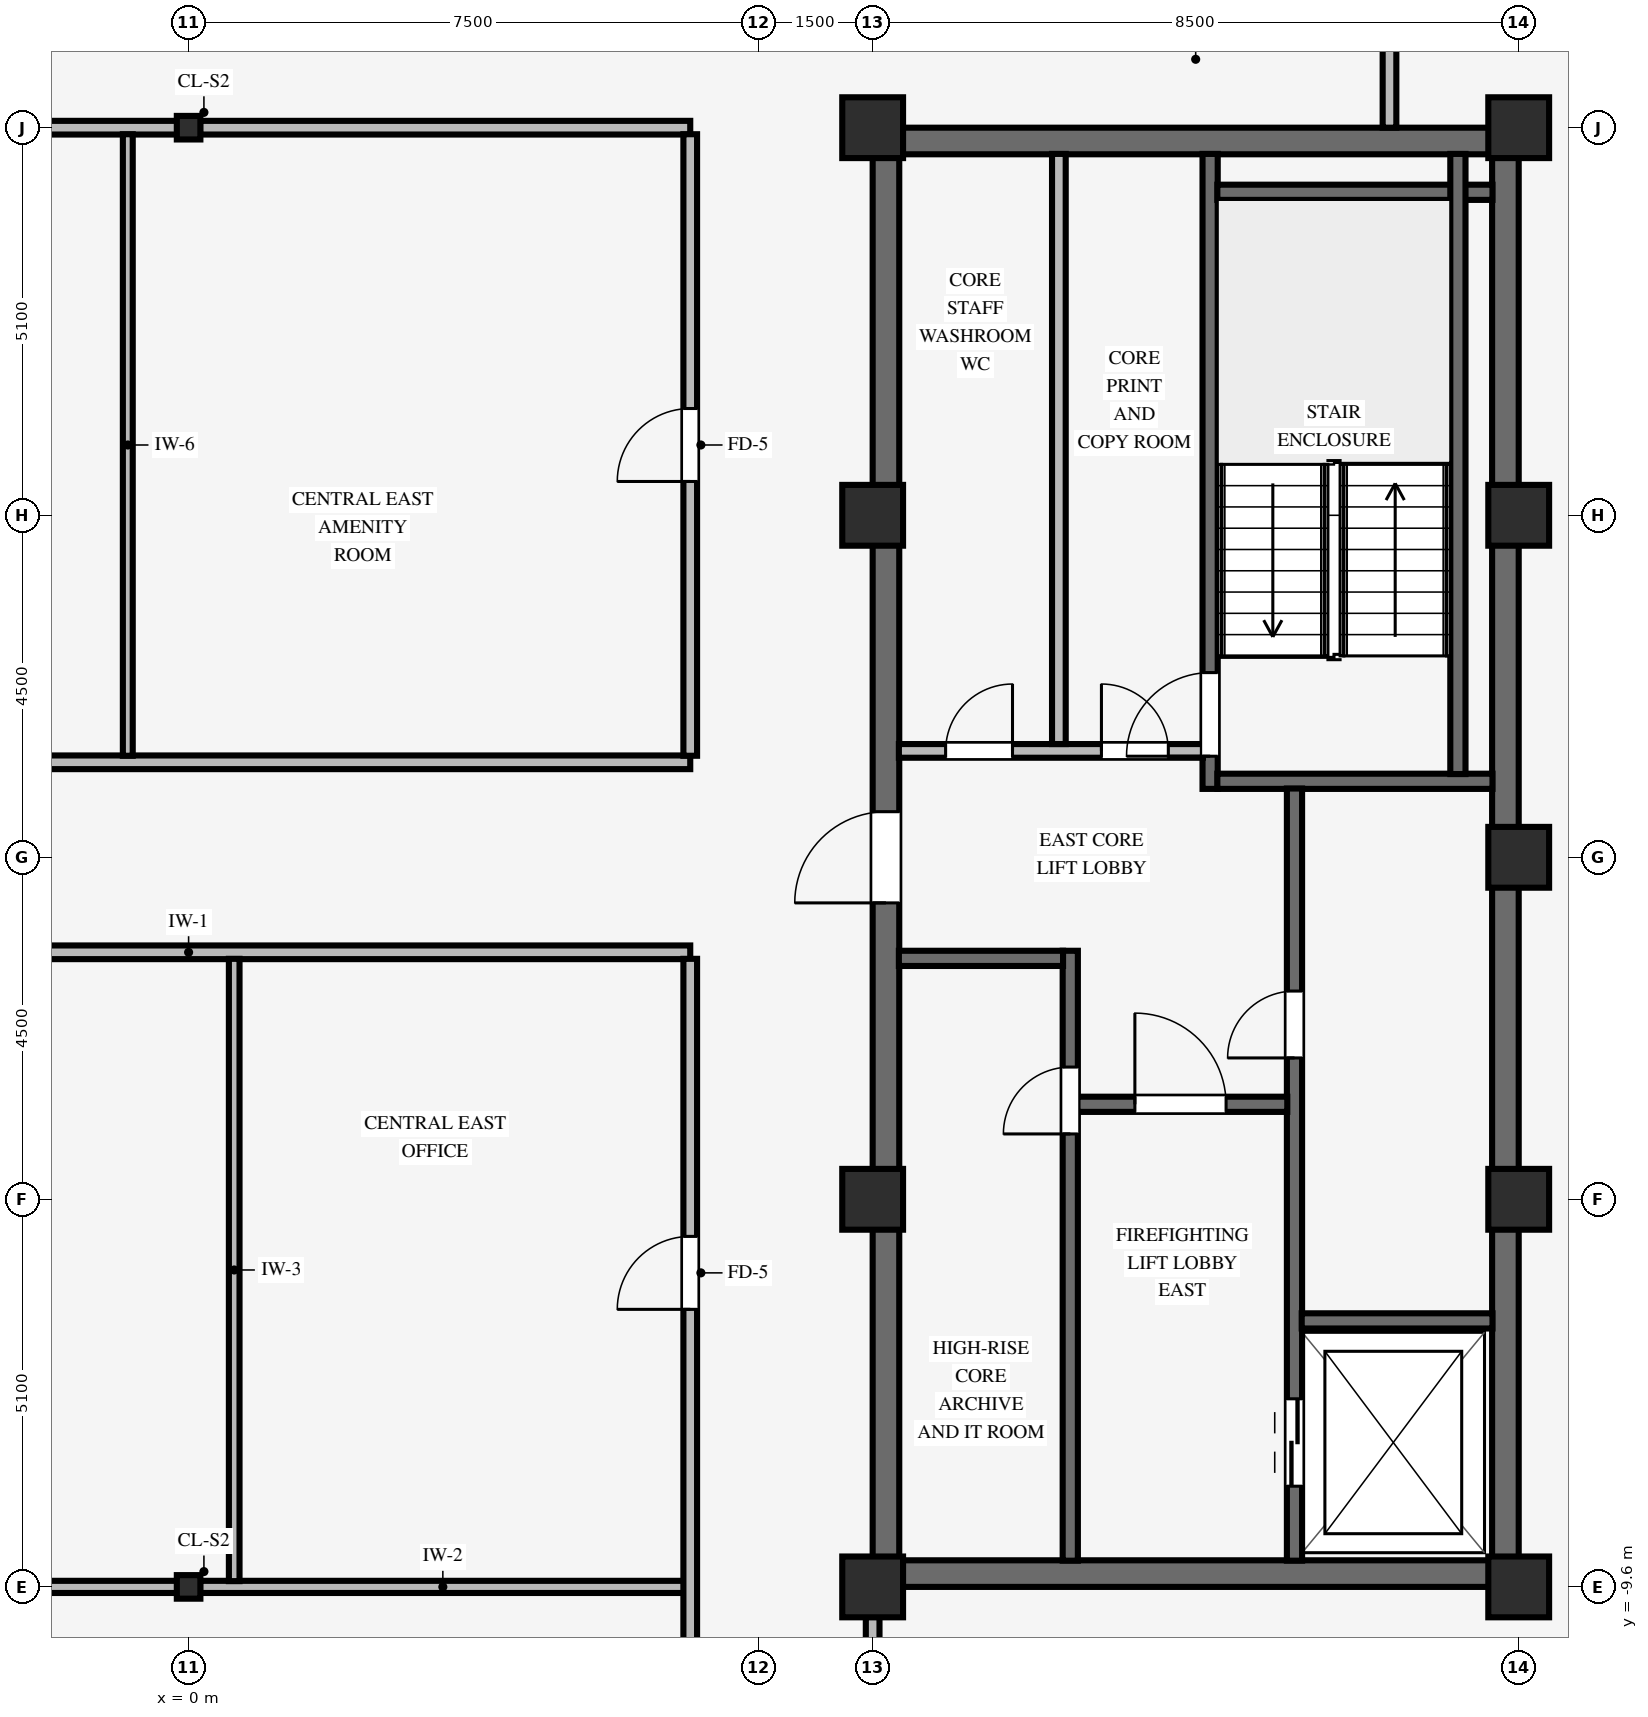
"""IFC4 building model, lengths in metres.
Left out: names, types, materials, properties, quantities, classifications, styles, units other than length and angle.
Written with IfcOpenShell. Run it as: python <this file> out.ifc"""

import sys

from ifc_helpers import new_model, si_unit, direction, frame, frame_2d, origin, origin_2d, place, context, subcontext, project, spatial, rectangle, i_section, extrude, source, transform, mapped, element, fill, save


model = new_model("IFC4")
c1 = context("Model", 3, precision=1e-05, world=origin(), true_north=direction((0.0, 1.0)))
c2 = subcontext(c1, "Body", "Model", "MODEL_VIEW")
j1 = project(units=[si_unit("LENGTHUNIT", "METRE"), si_unit("PLANEANGLEUNIT", "RADIAN")], contexts=[c1])
p1 = place(None, origin())
s1 = spatial("IfcSite", under=j1, at=p1, CompositionType="ELEMENT")
p2 = place(p1, origin())
s2 = spatial("IfcBuilding", under=s1, at=p2, CompositionType="ELEMENT")
p3 = place(p2, frame((0.0, 0.0, 234.7)))
s3 = spatial("IfcBuildingStorey", under=s2, at=p3, CompositionType="ELEMENT", Elevation=234.7)
for number, where, z_axis, x_axis in (
    (1, (9.0, -9.425, 0.0), (0.0, 0.0, 1.0), (1.0, 0.0, 0.0)),
    (2, (9.0, 9.425, 0.0), (0.0, 0.0, 1.0), (1.0, 0.0, 0.0)),
):
    element("IfcWall", number, at=place(p3, frame(where, z_axis=z_axis, x_axis=x_axis)), inside=s3, PredefinedType="SHEAR", context=c2, shape_type="SweptSolid", body=[
        extrude(rectangle(XDim=8.5, YDim=0.35, at=frame_2d((4.25, 0.0))), origin(), (0.0, 0.0, 1.0), 3.37),
    ])
p4 = place(p3, frame((9.175, -9.255, 0.0), z_axis=(0.0, 0.0, 1.0), x_axis=(0.0, 1.0, 0.0)))
e3 = element("IfcWall", 3, at=p4, inside=s3, PredefinedType="SHEAR", context=c2, shape_type="SweptSolid", body=[
    extrude(rectangle(XDim=18.51, YDim=0.35, at=frame_2d((9.255, 0.0))), origin(), (0.0, 0.0, 1.0), 3.37),
])
p5 = place(p4, frame((8.655, 0.0, 0.0)))
e4 = element("IfcOpeningElement", 4, at=p5, cuts=e3, PredefinedType="OPENING", context=c2, shape_type="SweptSolid", body=[
    extrude(rectangle(XDim=1.2, YDim=2.15, at=frame_2d((0.6, 1.075))), frame((0.0, 0.185, 0.0), z_axis=(0.0, -1.0, 0.0), x_axis=(1.0, 0.0, 0.0)), (0.0, 0.0, 1.0), 0.37),
])
p6 = place(p3, frame((17.325, -9.255, 0.0), z_axis=(0.0, 0.0, 1.0), x_axis=(0.0, 1.0, 0.0)))
e5 = element("IfcWall", 5, at=p6, inside=s3, PredefinedType="SHEAR", context=c2, shape_type="SweptSolid", body=[
    extrude(rectangle(XDim=18.51, YDim=0.35, at=frame_2d((9.255, 0.0))), origin(), (0.0, 0.0, 1.0), 3.37),
])
for number, where, z_axis, x_axis in (
    (6, (9.0, -9.6, 0.0), (0.0, 0.0, 1.0), (1.0, 0.0, 0.0)),
    (7, (9.0, -4.5, 0.0), (0.0, 0.0, 1.0), (1.0, 0.0, 0.0)),
    (8, (9.0, 4.5, 0.0), (0.0, 0.0, 1.0), (1.0, 0.0, 0.0)),
    (9, (9.0, 9.6, 0.0), (0.0, 0.0, 1.0), (1.0, 0.0, 0.0)),
    (10, (17.5, -9.6, 0.0), (0.0, 0.0, 1.0), (1.0, 0.0, 0.0)),
    (11, (17.5, -4.5, 0.0), (0.0, 0.0, 1.0), (1.0, 0.0, 0.0)),
    (12, (17.5, 4.5, 0.0), (0.0, 0.0, 1.0), (1.0, 0.0, 0.0)),
    (13, (17.5, 9.6, 0.0), (0.0, 0.0, 1.0), (1.0, 0.0, 0.0)),
    (14, (17.5, 0.0, 0.0), (0.0, 0.0, 1.0), (1.0, 0.0, 0.0)),
):
    element("IfcColumn", number, at=place(p3, frame(where, z_axis=z_axis, x_axis=x_axis)), inside=s3, PredefinedType="COLUMN", context=c2, shape_type="SweptSolid", body=[
        extrude(rectangle(XDim=0.8, YDim=0.8, at=origin_2d()), origin(), (0.0, 0.0, 1.0), 3.37),
    ])
for number, where, z_axis, x_axis in (
    (15, (0.0, -9.6, 0.0), (0.0, 0.0, 1.0), (1.0, 0.0, 0.0)),
    (16, (0.0, 9.6, 0.0), (0.0, 0.0, 1.0), (1.0, 0.0, 0.0)),
):
    element("IfcColumn", number, at=place(p3, frame(where, z_axis=z_axis, x_axis=x_axis)), inside=s3, PredefinedType="COLUMN", context=c2, shape_type="SweptSolid", body=[
        extrude(i_section(OverallWidth=0.31, OverallDepth=0.31, WebThickness=0.015, FlangeThickness=0.015, FilletRadius=0.015, at=origin_2d()), origin(), (0.0, 0.0, 1.0), 3.37),
    ])
p7 = place(p3, frame((13.44, 0.9, 0.0), z_axis=(0.0, 0.0, 1.0), x_axis=(0.0, 1.0, 0.0)))
e17 = element("IfcWall", 17, at=p7, inside=s3, PredefinedType="SHEAR", context=c2, shape_type="SweptSolid", body=[
    extrude(rectangle(XDim=8.355, YDim=0.2, at=frame_2d((4.177, 0.0))), origin(), (0.0, 0.0, 1.0), 3.37),
])
p8 = place(p7, frame((0.43, 0.0, 0.0)))
e18 = element("IfcOpeningElement", 18, at=p8, cuts=e17, PredefinedType="OPENING", context=c2, shape_type="SweptSolid", body=[
    extrude(rectangle(XDim=1.1, YDim=2.15, at=frame_2d((0.55, 1.075))), frame((0.0, 0.11, 0.0), z_axis=(0.0, -1.0, 0.0), x_axis=(1.0, 0.0, 0.0)), (0.0, 0.0, 1.0), 0.22),
])
for number, where, z_axis, x_axis in (
    (19, (13.535, 1.0, 0.0), (0.0, 0.0, 1.0), (1.0, 0.0, 0.0)),
    (20, (13.535, 8.75, 0.0), (0.0, 0.0, 1.0), (1.0, 0.0, 0.0)),
):
    element("IfcWall", number, at=place(p3, frame(where, z_axis=z_axis, x_axis=x_axis)), inside=s3, PredefinedType="SHEAR", context=c2, shape_type="SweptSolid", body=[
        extrude(rectangle(XDim=3.62, YDim=0.2, at=frame_2d((1.81, 0.0))), origin(), (0.0, 0.0, 1.0), 3.37),
    ])
p9 = place(p3, frame((16.7, 1.095, 0.0), z_axis=(0.0, 0.0, 1.0), x_axis=(0.0, 1.0, 0.0)))
e21 = element("IfcWall", 21, at=p9, inside=s3, PredefinedType="SHEAR", context=c2, shape_type="SweptSolid", body=[
    extrude(rectangle(XDim=8.16, YDim=0.2, at=frame_2d((4.08, 0.0))), origin(), (0.0, 0.0, 1.0), 3.37),
])
p10 = place(p3, frame((14.55, -9.255, 0.0), z_axis=(0.0, 0.0, 1.0), x_axis=(0.0, 1.0, 0.0)))
e22 = element("IfcWall", 22, at=p10, inside=s3, PredefinedType="SHEAR", context=c2, shape_type="SweptSolid", body=[
    extrude(rectangle(XDim=10.16, YDim=0.2, at=frame_2d((5.08, 0.0))), origin(), (0.0, 0.0, 1.0), 3.37),
])
p11 = place(p10, frame((6.615, 0.0, 0.0)))
e23 = element("IfcOpeningElement", 23, at=p11, cuts=e22, PredefinedType="OPENING", context=c2, shape_type="SweptSolid", body=[
    extrude(rectangle(XDim=0.88, YDim=2.1, at=frame_2d((0.44, 1.05))), frame((0.0, 0.11, 0.0), z_axis=(0.0, -1.0, 0.0), x_axis=(1.0, 0.0, 0.0)), (0.0, 0.0, 1.0), 0.22),
])
p12 = place(p10, frame((0.98, 0.0, 0.0)))
e24 = element("IfcOpeningElement", 24, at=p12, cuts=e22, PredefinedType="OPENING", context=c2, shape_type="SweptSolid", body=[
    extrude(rectangle(XDim=1.15, YDim=2.15, at=frame_2d((0.575, 1.075))), frame((0.0, 0.11, 0.0), z_axis=(0.0, -1.0, 0.0), x_axis=(1.0, 0.0, 0.0)), (0.0, 0.0, 1.0), 0.22),
])
p13 = place(p3, frame((14.645, -6.1, 0.0), z_axis=(0.0, 0.0, 1.0), x_axis=(1.0, 0.0, 0.0)))
e25 = element("IfcWall", 25, at=p13, inside=s3, PredefinedType="SHEAR", context=c2, shape_type="SweptSolid", body=[
    extrude(rectangle(XDim=2.51, YDim=0.2, at=frame_2d((1.255, 0.0))), origin(), (0.0, 0.0, 1.0), 3.37),
])
p14 = place(p3, frame((11.6, -9.255, 0.0), z_axis=(0.0, 0.0, 1.0), x_axis=(0.0, 1.0, 0.0)))
e26 = element("IfcWall", 26, at=p14, inside=s3, PredefinedType="SHEAR", context=c2, shape_type="SweptSolid", body=[
    extrude(rectangle(XDim=8.025, YDim=0.2, at=frame_2d((4.012, 0.0))), origin(), (0.0, 0.0, 1.0), 3.37),
])
p15 = place(p14, frame((5.615, 0.0, 0.0)))
e27 = element("IfcOpeningElement", 27, at=p15, cuts=e26, PredefinedType="OPENING", context=c2, shape_type="SweptSolid", body=[
    extrude(rectangle(XDim=0.88, YDim=2.1, at=frame_2d((0.44, 1.05))), frame((0.0, 0.11, 0.0), z_axis=(0.0, -1.0, 0.0), x_axis=(1.0, 0.0, 0.0)), (0.0, 0.0, 1.0), 0.22),
])
p16 = place(p3, frame((11.695, -3.25, 0.0), z_axis=(0.0, 0.0, 1.0), x_axis=(1.0, 0.0, 0.0)))
e28 = element("IfcWall", 28, at=p16, inside=s3, PredefinedType="SHEAR", context=c2, shape_type="SweptSolid", body=[
    extrude(rectangle(XDim=2.76, YDim=0.2, at=frame_2d((1.38, 0.0))), origin(), (0.0, 0.0, 1.0), 3.37),
])
p17 = place(p16, frame((0.755, 0.0, 0.0)))
e29 = element("IfcOpeningElement", 29, at=p17, cuts=e28, PredefinedType="OPENING", context=c2, shape_type="SweptSolid", body=[
    extrude(rectangle(XDim=1.2, YDim=2.15, at=frame_2d((0.6, 1.075))), frame((0.0, 0.11, 0.0), z_axis=(0.0, -1.0, 0.0), x_axis=(1.0, 0.0, 0.0)), (0.0, 0.0, 1.0), 0.22),
])
p18 = place(p3, frame((9.345, -1.33, 0.0), z_axis=(0.0, 0.0, 1.0), x_axis=(1.0, 0.0, 0.0)))
e30 = element("IfcWall", 30, at=p18, inside=s3, PredefinedType="SHEAR", context=c2, shape_type="SweptSolid", body=[
    extrude(rectangle(XDim=2.16, YDim=0.2, at=frame_2d((1.08, 0.0))), origin(), (0.0, 0.0, 1.0), 3.37),
])
p19 = place(p3, frame((9.345, 1.4, 0.0), z_axis=(0.0, 0.0, 1.0), x_axis=(1.0, 0.0, 0.0)))
e31 = element("IfcWall", 31, at=p19, inside=s3, PredefinedType="PARTITIONING", context=c2, shape_type="SweptSolid", body=[
    extrude(rectangle(XDim=4.0, YDim=0.18, at=frame_2d((2.0, 0.0))), origin(), (0.0, 0.0, 1.0), 3.36),
])
p20 = place(p19, frame((0.615, 0.0, 0.0)))
e32 = element("IfcOpeningElement", 32, at=p20, cuts=e31, PredefinedType="OPENING", context=c2, shape_type="SweptSolid", body=[
    extrude(rectangle(XDim=0.88, YDim=2.1, at=frame_2d((0.44, 1.05))), frame((0.0, 0.1, 0.0), z_axis=(0.0, -1.0, 0.0), x_axis=(1.0, 0.0, 0.0)), (0.0, 0.0, 1.0), 0.2),
])
p21 = place(p19, frame((2.665, 0.0, 0.0)))
e33 = element("IfcOpeningElement", 33, at=p21, cuts=e31, PredefinedType="OPENING", context=c2, shape_type="SweptSolid", body=[
    extrude(rectangle(XDim=0.88, YDim=2.1, at=frame_2d((0.44, 1.05))), frame((0.0, 0.1, 0.0), z_axis=(0.0, -1.0, 0.0), x_axis=(1.0, 0.0, 0.0)), (0.0, 0.0, 1.0), 0.2),
])
p22 = place(p3, frame((11.45, 1.49, 0.0), z_axis=(0.0, 0.0, 1.0), x_axis=(0.0, 1.0, 0.0)))
e34 = element("IfcWall", 34, at=p22, inside=s3, PredefinedType="PARTITIONING", context=c2, shape_type="SweptSolid", body=[
    extrude(rectangle(XDim=7.765, YDim=0.18, at=frame_2d((3.882, 0.0))), origin(), (0.0, 0.0, 1.0), 3.36),
])
for number, where, z_axis, x_axis in (
    (35, (-6.539, -9.6, 0.0), (0.0, 0.0, 1.0), (1.0, 0.0, 0.0)),
    (36, (0.151, -9.6, 0.0), (0.0, 0.0, 1.0), (1.0, 0.0, 0.0)),
):
    element("IfcWall", number, at=place(p3, frame(where, z_axis=z_axis, x_axis=x_axis)), inside=s3, PredefinedType="PARTITIONING", context=c2, shape_type="SweptSolid", body=[
        extrude(rectangle(XDim=6.388, YDim=0.16, at=frame_2d((3.194, 0.0))), origin(), (0.0, 0.0, 1.0), 2.405),
    ])
for number, where, z_axis, x_axis in (
    (37, (-6.6, -1.25, 0.0), (0.0, 0.0, 1.0), (1.0, 0.0, 0.0)),
    (38, (-6.6, 1.25, 0.0), (0.0, 0.0, 1.0), (1.0, 0.0, 0.0)),
):
    element("IfcWall", number, at=place(p3, frame(where, z_axis=z_axis, x_axis=x_axis)), inside=s3, PredefinedType="PARTITIONING", context=c2, shape_type="SweptSolid", body=[
        extrude(rectangle(XDim=13.2, YDim=0.18, at=frame_2d((6.6, 0.0))), origin(), (0.0, 0.0, 1.0), 3.36),
    ])
for number, where, z_axis, x_axis in (
    (39, (-6.6, 9.6, 0.0), (0.0, 0.0, 1.0), (1.0, 0.0, 0.0)),
    (40, (0.151, 9.6, 0.0), (0.0, 0.0, 1.0), (1.0, 0.0, 0.0)),
):
    element("IfcWall", number, at=place(p3, frame(where, z_axis=z_axis, x_axis=x_axis)), inside=s3, PredefinedType="PARTITIONING", context=c2, shape_type="SweptSolid", body=[
        extrude(rectangle(XDim=6.449, YDim=0.18, at=frame_2d((3.225, 0.0))), origin(), (0.0, 0.0, 1.0), 2.405),
    ])
p23 = place(p3, frame((-0.8, 1.336, 0.0), z_axis=(0.0, 0.0, 1.0), x_axis=(0.0, 1.0, 0.0)))
e41 = element("IfcWall", 41, at=p23, inside=s3, PredefinedType="PARTITIONING", context=c2, shape_type="SweptSolid", body=[
    extrude(rectangle(XDim=8.178, YDim=0.13, at=frame_2d((4.089, 0.0))), origin(), (0.0, 0.0, 1.0), 3.36),
])
p24 = place(p3, frame((0.6, -9.524, 0.0), z_axis=(0.0, 0.0, 1.0), x_axis=(0.0, 1.0, 0.0)))
e42 = element("IfcWall", 42, at=p24, inside=s3, PredefinedType="PARTITIONING", context=c2, shape_type="SweptSolid", body=[
    extrude(rectangle(XDim=8.188, YDim=0.14, at=frame_2d((4.094, 0.0))), origin(), (0.0, 0.0, 1.0), 3.36),
])
p25 = place(p3, frame((6.6, -19.1, 0.0), z_axis=(0.0, 0.0, 1.0), x_axis=(0.0, 1.0, 0.0)))
e43 = element("IfcWall", 43, at=p25, inside=s3, PredefinedType="PARTITIONING", context=c2, shape_type="SweptSolid", body=[
    extrude(rectangle(XDim=17.764, YDim=0.18, at=frame_2d((8.882, 0.0))), origin(), (0.0, 0.0, 1.0), 3.36),
])
p26 = place(p25, frame((13.152, 0.0, 0.0)))
e44 = element("IfcOpeningElement", 44, at=p26, cuts=e43, PredefinedType="OPENING", context=c2, shape_type="SweptSolid", body=[
    extrude(rectangle(XDim=0.96, YDim=2.1, at=frame_2d((0.48, 1.05))), frame((0.0, 0.1, 0.0), z_axis=(0.0, -1.0, 0.0), x_axis=(1.0, 0.0, 0.0)), (0.0, 0.0, 1.0), 0.2),
])
p27 = place(p25, frame((6.72, 0.0, 0.0)))
e45 = element("IfcOpeningElement", 45, at=p27, cuts=e43, PredefinedType="OPENING", context=c2, shape_type="SweptSolid", body=[
    extrude(rectangle(XDim=0.96, YDim=2.1, at=frame_2d((0.48, 1.05))), frame((0.0, 0.1, 0.0), z_axis=(0.0, -1.0, 0.0), x_axis=(1.0, 0.0, 0.0)), (0.0, 0.0, 1.0), 0.2),
])
p28 = place(p3, frame((6.6, 1.336, 0.0), z_axis=(0.0, 0.0, 1.0), x_axis=(0.0, 1.0, 0.0)))
e46 = element("IfcWall", 46, at=p28, inside=s3, PredefinedType="PARTITIONING", context=c2, shape_type="SweptSolid", body=[
    extrude(rectangle(XDim=8.178, YDim=0.18, at=frame_2d((4.089, 0.0))), origin(), (0.0, 0.0, 1.0), 3.36),
])
p29 = place(p28, frame((3.609, 0.0, 0.0)))
e47 = element("IfcOpeningElement", 47, at=p29, cuts=e46, PredefinedType="OPENING", context=c2, shape_type="SweptSolid", body=[
    extrude(rectangle(XDim=0.96, YDim=2.1, at=frame_2d((0.48, 1.05))), frame((0.0, 0.1, 0.0), z_axis=(0.0, -1.0, 0.0), x_axis=(1.0, 0.0, 0.0)), (0.0, 0.0, 1.0), 0.2),
])
p30 = place(p3, frame((9.0, -15.314, 0.0), z_axis=(0.0, 0.0, 1.0), x_axis=(0.0, 1.0, 0.0)))
e48 = element("IfcWall", 48, at=p30, inside=s3, PredefinedType="PARTITIONING", context=c2, shape_type="SweptSolid", body=[
    extrude(rectangle(XDim=5.318, YDim=0.18, at=frame_2d((2.659, 0.0))), origin(), (0.0, 0.0, 1.0), 2.892),
])
p31 = place(p30, frame((2.179, 0.0, 0.0)))
e49 = element("IfcOpeningElement", 49, at=p31, cuts=e48, PredefinedType="OPENING", context=c2, shape_type="SweptSolid", body=[
    extrude(rectangle(XDim=0.96, YDim=2.1, at=frame_2d((0.48, 1.05))), frame((0.0, 0.1, 0.0), z_axis=(0.0, -1.0, 0.0), x_axis=(1.0, 0.0, 0.0)), (0.0, 0.0, 1.0), 0.2),
])
p32 = place(p3, frame((15.8, 9.6, 0.0), z_axis=(0.0, 0.0, 1.0), x_axis=(0.0, 1.0, 0.0)))
e50 = element("IfcWall", 50, at=p32, inside=s3, PredefinedType="PARTITIONING", context=c2, shape_type="SweptSolid", body=[
    extrude(rectangle(XDim=2.514, YDim=0.18, at=frame_2d((1.257, 0.0))), origin(), (0.0, 0.0, 1.0), 3.36),
])
m1 = source(origin(), c2, "Body", "SweptSolid", [
    extrude(rectangle(XDim=1.1, YDim=2.15, at=frame_2d((0.55, 1.075))), frame((0.0, 0.025, 0.0), z_axis=(0.0, -1.0, 0.0), x_axis=(1.0, 0.0, 0.0)), (0.0, 0.0, 1.0), 0.05),
])
p33 = place(p8, origin())
e51 = element("IfcDoor", 51, at=p33, inside=s3, OperationType="SINGLE_SWING_LEFT", PredefinedType="DOOR", context=c2, shape_type="MappedRepresentation", body=[
    mapped(m1, transform((0.0, 0.0, 0.0), scale=1.0)),
])
fill(e18, e51)
m2 = source(origin(), c2, "Body", "SweptSolid", [
    extrude(rectangle(XDim=0.88, YDim=2.1, at=frame_2d((0.44, 1.05))), frame((0.0, 0.025, 0.0), z_axis=(0.0, -1.0, 0.0), x_axis=(1.0, 0.0, 0.0)), (0.0, 0.0, 1.0), 0.05),
])
p34 = place(p11, origin())
e52 = element("IfcDoor", 52, at=p34, inside=s3, OperationType="SINGLE_SWING_LEFT", PredefinedType="DOOR", context=c2, shape_type="MappedRepresentation", body=[
    mapped(m2, transform((0.0, 0.0, 0.0), scale=1.0)),
])
fill(e23, e52)
m3 = source(origin(), c2, "Body", "SweptSolid", [
    extrude(rectangle(XDim=1.2, YDim=2.15, at=frame_2d((0.6, 1.075))), frame((0.0, 0.025, 0.0), z_axis=(0.0, -1.0, 0.0), x_axis=(1.0, 0.0, 0.0)), (0.0, 0.0, 1.0), 0.05),
])
p35 = place(p17, origin())
e53 = element("IfcDoor", 53, at=p35, inside=s3, OperationType="SINGLE_SWING_LEFT", PredefinedType="DOOR", context=c2, shape_type="MappedRepresentation", body=[
    mapped(m3, transform((0.0, 0.0, 0.0), scale=1.0)),
])
fill(e29, e53)
p36 = place(p15, origin())
e54 = element("IfcDoor", 54, at=p36, inside=s3, OperationType="SINGLE_SWING_LEFT", PredefinedType="DOOR", context=c2, shape_type="MappedRepresentation", body=[
    mapped(m2, transform((0.0, 0.0, 0.0), scale=1.0)),
])
fill(e27, e54)
p37 = place(p5, origin())
e55 = element("IfcDoor", 55, at=p37, inside=s3, OperationType="SINGLE_SWING_LEFT", PredefinedType="DOOR", context=c2, shape_type="MappedRepresentation", body=[
    mapped(m3, transform((0.0, 0.0, 0.0), scale=1.0)),
])
fill(e4, e55)
p38 = place(p20, origin())
e56 = element("IfcDoor", 56, at=p38, inside=s3, OperationType="SINGLE_SWING_RIGHT", PredefinedType="DOOR", context=c2, shape_type="MappedRepresentation", body=[
    mapped(m2, transform((0.0, 0.0, 0.0), scale=1.0)),
])
fill(e32, e56)
p39 = place(p21, origin())
e57 = element("IfcDoor", 57, at=p39, inside=s3, OperationType="SINGLE_SWING_LEFT", PredefinedType="DOOR", context=c2, shape_type="MappedRepresentation", body=[
    mapped(m2, transform((0.0, 0.0, 0.0), scale=1.0)),
])
fill(e33, e57)
m4 = source(origin(), c2, "Body", "SweptSolid", [
    extrude(rectangle(XDim=1.15, YDim=2.15, at=frame_2d((0.575, 1.075))), frame((0.0, 0.025, 0.0), z_axis=(0.0, -1.0, 0.0), x_axis=(1.0, 0.0, 0.0)), (0.0, 0.0, 1.0), 0.05),
])
p40 = place(p12, origin())
e58 = element("IfcDoor", 58, at=p40, inside=s3, OperationType="DOUBLE_DOOR_SLIDING", PredefinedType="DOOR", context=c2, shape_type="MappedRepresentation", body=[
    mapped(m4, transform((0.0, 0.0, 0.0), scale=1.0)),
])
fill(e24, e58)
m5 = source(origin(), c2, "Body", "SweptSolid", [
    extrude(rectangle(XDim=0.96, YDim=2.1, at=frame_2d((0.48, 1.05))), frame((0.0, 0.025, 0.0), z_axis=(0.0, -1.0, 0.0), x_axis=(1.0, 0.0, 0.0)), (0.0, 0.0, 1.0), 0.05),
])
p41 = place(p26, origin())
e59 = element("IfcDoor", 59, at=p41, inside=s3, OperationType="SINGLE_SWING_LEFT", PredefinedType="DOOR", context=c2, shape_type="MappedRepresentation", body=[
    mapped(m5, transform((0.0, 0.0, 0.0), scale=1.0)),
])
fill(e44, e59)
p42 = place(p29, origin())
e60 = element("IfcDoor", 60, at=p42, inside=s3, OperationType="SINGLE_SWING_LEFT", PredefinedType="DOOR", context=c2, shape_type="MappedRepresentation", body=[
    mapped(m5, transform((0.0, 0.0, 0.0), scale=1.0)),
])
fill(e47, e60)
save(model, sys.argv[1])
